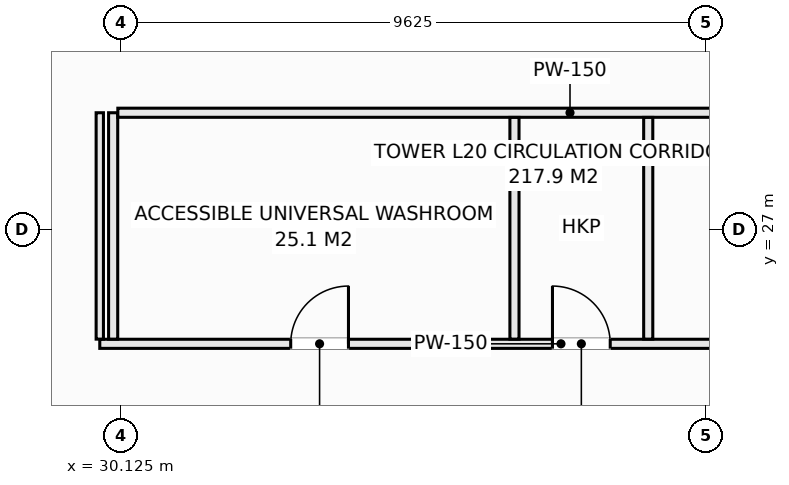
"""IFC4 building model, lengths in metres.
Left out: names, types, materials, properties, quantities, classifications, styles, units other than length and angle.
Written with IfcOpenShell. Run it as: python <this file> out.ifc"""

import sys

from ifc_helpers import new_model, si_unit, direction, frame, frame_2d, origin, place, context, subcontext, project, spatial, rectangle, extrude, element, fill, save


model = new_model("IFC4")
c1 = context("Model", 3, precision=1e-05, world=origin(), true_north=direction((0.0, 1.0)))
c2 = subcontext(c1, "Body", "Model", "MODEL_VIEW")
j1 = project(units=[si_unit("LENGTHUNIT", "METRE"), si_unit("PLANEANGLEUNIT", "RADIAN")], contexts=[c1])
p1 = place(None, origin())
s1 = spatial("IfcSite", under=j1, at=p1, CompositionType="ELEMENT")
p2 = place(p1, origin())
s2 = spatial("IfcBuilding", under=s1, at=p2, CompositionType="ELEMENT")
p3 = place(p2, frame((0.0, 0.0, 84.25)))
s3 = spatial("IfcBuildingStorey", under=s2, at=p3, CompositionType="ELEMENT", Elevation=84.25)
p4 = place(p3, frame((29.78, 25.12, 0.0), z_axis=(0.0, 0.0, 1.0), x_axis=(1.0, 0.0, 0.0)))
e1 = element("IfcWall", 1, at=p4, inside=s3, PredefinedType="PARTITIONING", context=c2, shape_type="SweptSolid", body=[
    extrude(rectangle(XDim=15.17, YDim=0.15, at=frame_2d((7.585, 0.0))), origin(), (0.0, 0.0, 1.0), 3.57),
])
p5 = place(p4, frame((3.14, 0.0, 0.0)))
e2 = element("IfcOpeningElement", 2, at=p5, cuts=e1, PredefinedType="OPENING", context=c2, shape_type="SweptSolid", body=[
    extrude(rectangle(XDim=0.95, YDim=2.1, at=frame_2d((0.475, 1.05))), frame((0.0, 0.085, 0.0), z_axis=(0.0, -1.0, 0.0), x_axis=(1.0, 0.0, 0.0)), (0.0, 0.0, 1.0), 0.17),
])
p6 = place(p4, frame((7.445, 0.0, 0.0)))
e3 = element("IfcOpeningElement", 3, at=p6, cuts=e1, PredefinedType="OPENING", context=c2, shape_type="SweptSolid", body=[
    extrude(rectangle(XDim=0.95, YDim=2.1, at=frame_2d((0.475, 1.05))), frame((0.0, 0.085, 0.0), z_axis=(0.0, -1.0, 0.0), x_axis=(1.0, 0.0, 0.0)), (0.0, 0.0, 1.0), 0.17),
])
p7 = place(p4, frame((10.995, 0.0, 0.0)))
e4 = element("IfcOpeningElement", 4, at=p7, cuts=e1, PredefinedType="OPENING", context=c2, shape_type="SweptSolid", body=[
    extrude(rectangle(XDim=0.95, YDim=2.1, at=frame_2d((0.475, 1.05))), frame((0.0, 0.085, 0.0), z_axis=(0.0, -1.0, 0.0), x_axis=(1.0, 0.0, 0.0)), (0.0, 0.0, 1.0), 0.17),
])
p8 = place(p3, frame((30.0, 25.197, 0.0), z_axis=(0.0, 0.0, 1.0), x_axis=(0.0, 1.0, 0.0)))
e5 = element("IfcWall", 5, at=p8, inside=s3, PredefinedType="PARTITIONING", context=c2, shape_type="SweptSolid", body=[
    extrude(rectangle(XDim=3.723, YDim=0.15, at=frame_2d((1.861, 0.0))), origin(), (0.0, 0.0, 1.0), 3.57),
])
p9 = place(p3, frame((30.077, 28.92, 0.0), z_axis=(0.0, 0.0, 1.0), x_axis=(1.0, 0.0, 0.0)))
e6 = element("IfcWall", 6, at=p9, inside=s3, PredefinedType="PARTITIONING", context=c2, shape_type="SweptSolid", body=[
    extrude(rectangle(XDim=14.873, YDim=0.15, at=frame_2d((7.437, 0.0))), origin(), (0.0, 0.0, 1.0), 3.57),
])
for number, where, z_axis, x_axis in (
    (7, (36.6, 25.197, 0.0), (0.0, 0.0, 1.0), (0.0, 1.0, 0.0)),
    (8, (38.8, 25.197, 0.0), (0.0, 0.0, 1.0), (0.0, 1.0, 0.0)),
):
    element("IfcWall", number, at=place(p3, frame(where, z_axis=z_axis, x_axis=x_axis)), inside=s3, PredefinedType="PARTITIONING", context=c2, shape_type="SweptSolid", body=[
        extrude(rectangle(XDim=3.646, YDim=0.15, at=frame_2d((1.823, 0.0))), origin(), (0.0, 0.0, 1.0), 3.57),
    ])
p10 = place(p3, frame((29.78, 25.197, 0.0), z_axis=(0.0, 0.0, 1.0), x_axis=(0.0, 1.0, 0.0)))
e9 = element("IfcWall", 9, at=p10, inside=s3, PredefinedType="PARTITIONING", context=c2, shape_type="SweptSolid", body=[
    extrude(rectangle(XDim=3.723, YDim=0.12, at=frame_2d((1.861, 0.0))), origin(), (0.0, 0.0, 1.0), 3.57),
])
p11 = place(p5, origin())
e10 = element("IfcDoor", 10, at=p11, inside=s3, OperationType="SINGLE_SWING_RIGHT", PredefinedType="DOOR", context=c2, shape_type="SweptSolid", body=[
    extrude(rectangle(XDim=0.95, YDim=2.1, at=frame_2d((0.475, 1.05))), frame((0.0, 0.025, 0.0), z_axis=(0.0, -1.0, 0.0), x_axis=(1.0, 0.0, 0.0)), (0.0, 0.0, 1.0), 0.05),
])
fill(e2, e10)
p12 = place(p6, origin())
e11 = element("IfcDoor", 11, at=p12, inside=s3, OperationType="SINGLE_SWING_LEFT", PredefinedType="DOOR", context=c2, shape_type="SweptSolid", body=[
    extrude(rectangle(XDim=0.95, YDim=2.1, at=frame_2d((0.475, 1.05))), frame((0.0, 0.025, 0.0), z_axis=(0.0, -1.0, 0.0), x_axis=(1.0, 0.0, 0.0)), (0.0, 0.0, 1.0), 0.05),
])
fill(e3, e11)
save(model, sys.argv[1])
